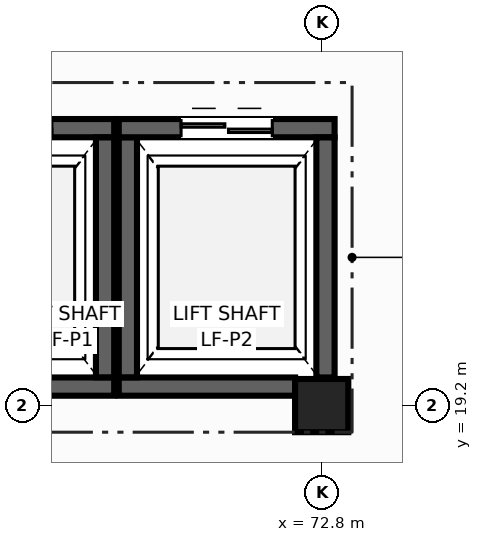
"""IFC4 building model, lengths in metres.
Left out: names, types, materials, properties, quantities, classifications, styles, units other than length and angle.
Written with IfcOpenShell. Run it as: python <this file> out.ifc"""

import sys

from ifc_helpers import new_model, si_unit, direction, frame, frame_2d, origin, origin_2d, place, context, subcontext, project, spatial, rectangle, extrude, element, fill, save


model = new_model("IFC4")
c1 = context("Model", 3, precision=1e-05, world=origin(), true_north=direction((0.0, 1.0)))
c2 = subcontext(c1, "Body", "Model", "MODEL_VIEW")
j1 = project(units=[si_unit("LENGTHUNIT", "METRE"), si_unit("PLANEANGLEUNIT", "RADIAN")], contexts=[c1])
p1 = place(None, origin())
s1 = spatial("IfcSite", under=j1, at=p1, CompositionType="ELEMENT")
p2 = place(p1, origin())
s2 = spatial("IfcBuilding", under=s1, at=p2, CompositionType="ELEMENT")
p3 = place(p2, frame((0.0, 0.0, 5.4)))
s3 = spatial("IfcBuildingStorey", under=s2, at=p3, CompositionType="ELEMENT", Elevation=5.4)
p4 = place(p3, frame((72.8, 19.2, 0.0), z_axis=(0.0, 0.0, 1.0), x_axis=(1.0, 0.0, 0.0)))
e1 = element("IfcColumn", 1, at=p4, inside=s3, PredefinedType="COLUMN", context=c2, shape_type="SweptSolid", body=[
    extrude(rectangle(XDim=0.7, YDim=0.7, at=origin_2d()), origin(), (0.0, 0.0, 1.0), 4.5),
])
p5 = place(p3, frame((70.07, 19.45, 0.0), z_axis=(0.0, 0.0, 1.0), x_axis=(-1.0, 0.0, 0.0)))
e2 = element("IfcWall", 2, at=p5, inside=s3, PredefinedType="SHEAR", context=c2, shape_type="SweptSolid", body=[
    extrude(rectangle(XDim=2.84, YDim=0.24, at=frame_2d((1.42, 0.0))), origin(), (0.0, 0.0, 1.0), 4.22),
])
p6 = place(p3, frame((67.23, 22.85, 0.0), z_axis=(0.0, 0.0, 1.0), x_axis=(1.0, 0.0, 0.0)))
e3 = element("IfcWall", 3, at=p6, inside=s3, PredefinedType="SHEAR", context=c2, shape_type="SweptSolid", body=[
    extrude(rectangle(XDim=2.84, YDim=0.24, at=frame_2d((1.42, 0.0))), origin(), (0.0, 0.0, 1.0), 4.22),
])
p7 = place(p6, frame((0.82, 0.0, 0.0)))
e4 = element("IfcOpeningElement", 4, at=p7, cuts=e3, PredefinedType="OPENING", context=c2, shape_type="SweptSolid", body=[
    extrude(rectangle(XDim=1.2, YDim=2.15, at=frame_2d((0.6, 1.075))), frame((0.0, 0.13, 0.0), z_axis=(0.0, -1.0, 0.0), x_axis=(1.0, 0.0, 0.0)), (0.0, 0.0, 1.0), 0.26),
])
p8 = place(p3, frame((69.95, 22.728, 0.0), z_axis=(0.0, 0.0, 1.0), x_axis=(0.0, -1.0, 0.0)))
e5 = element("IfcWall", 5, at=p8, inside=s3, PredefinedType="SHEAR", context=c2, shape_type="SweptSolid", body=[
    extrude(rectangle(XDim=3.156, YDim=0.24, at=frame_2d((1.578, 0.0))), origin(), (0.0, 0.0, 1.0), 4.22),
])
p9 = place(p3, frame((72.45, 19.45, 0.0), z_axis=(0.0, 0.0, 1.0), x_axis=(-1.0, 0.0, 0.0)))
e6 = element("IfcWall", 6, at=p9, inside=s3, PredefinedType="SHEAR", context=c2, shape_type="SweptSolid", body=[
    extrude(rectangle(XDim=2.32, YDim=0.24, at=frame_2d((1.16, 0.0))), origin(), (0.0, 0.0, 1.0), 4.22),
])
p10 = place(p3, frame((70.25, 19.572, 0.0), z_axis=(0.0, 0.0, 1.0), x_axis=(0.0, 1.0, 0.0)))
e7 = element("IfcWall", 7, at=p10, inside=s3, PredefinedType="SHEAR", context=c2, shape_type="SweptSolid", body=[
    extrude(rectangle(XDim=3.158, YDim=0.24, at=frame_2d((1.579, 0.0))), origin(), (0.0, 0.0, 1.0), 4.22),
])
p11 = place(p3, frame((70.13, 22.85, 0.0), z_axis=(0.0, 0.0, 1.0), x_axis=(1.0, 0.0, 0.0)))
e8 = element("IfcWall", 8, at=p11, inside=s3, PredefinedType="SHEAR", context=c2, shape_type="SweptSolid", body=[
    extrude(rectangle(XDim=2.84, YDim=0.24, at=frame_2d((1.42, 0.0))), origin(), (0.0, 0.0, 1.0), 4.22),
])
p12 = place(p11, frame((0.82, 0.0, 0.0)))
e9 = element("IfcOpeningElement", 9, at=p12, cuts=e8, PredefinedType="OPENING", context=c2, shape_type="SweptSolid", body=[
    extrude(rectangle(XDim=1.2, YDim=2.15, at=frame_2d((0.6, 1.075))), frame((0.0, 0.13, 0.0), z_axis=(0.0, -1.0, 0.0), x_axis=(1.0, 0.0, 0.0)), (0.0, 0.0, 1.0), 0.26),
])
p13 = place(p3, frame((72.85, 22.728, 0.0), z_axis=(0.0, 0.0, 1.0), x_axis=(0.0, -1.0, 0.0)))
e10 = element("IfcWall", 10, at=p13, inside=s3, PredefinedType="SHEAR", context=c2, shape_type="SweptSolid", body=[
    extrude(rectangle(XDim=3.158, YDim=0.24, at=frame_2d((1.579, 0.0))), origin(), (0.0, 0.0, 1.0), 4.22),
])
p14 = place(p7, origin())
e11 = element("IfcDoor", 11, at=p14, inside=s3, OperationType="DOUBLE_DOOR_SLIDING", PredefinedType="DOOR", context=c2, shape_type="SweptSolid", body=[
    extrude(rectangle(XDim=1.2, YDim=2.15, at=frame_2d((0.6, 1.075))), frame((0.0, 0.025, 0.0), z_axis=(0.0, -1.0, 0.0), x_axis=(1.0, 0.0, 0.0)), (0.0, 0.0, 1.0), 0.05),
])
fill(e4, e11)
p15 = place(p12, origin())
e12 = element("IfcDoor", 12, at=p15, inside=s3, OperationType="DOUBLE_DOOR_SLIDING", PredefinedType="DOOR", context=c2, shape_type="SweptSolid", body=[
    extrude(rectangle(XDim=1.2, YDim=2.15, at=frame_2d((0.6, 1.075))), frame((0.0, 0.025, 0.0), z_axis=(0.0, -1.0, 0.0), x_axis=(1.0, 0.0, 0.0)), (0.0, 0.0, 1.0), 0.05),
])
fill(e9, e12)
save(model, sys.argv[1])
